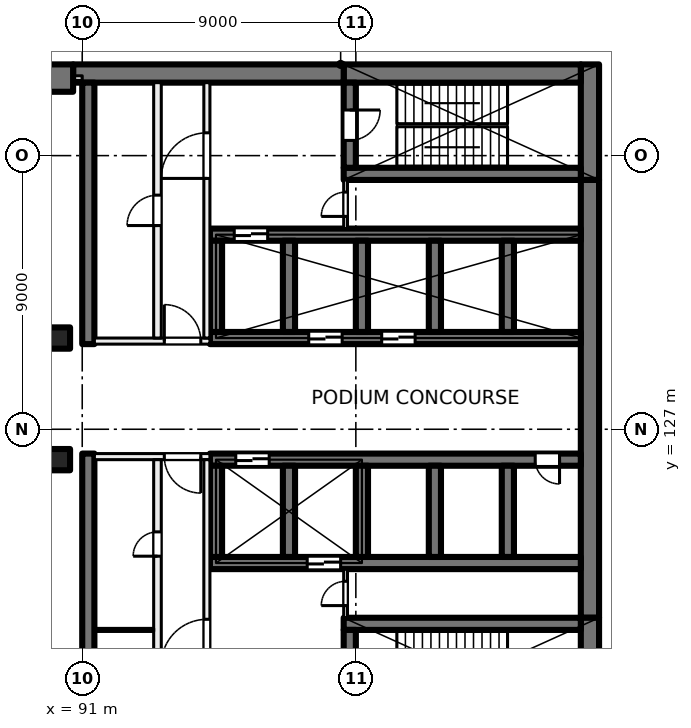
"""IFC4 building model, lengths in metres.
Left out: names, types, materials, properties, quantities, classifications, styles, units other than length and angle.
Written with IfcOpenShell. Run it as: python <this file> out.ifc"""

import sys

from ifc_helpers import new_model, si_unit, direction, frame, frame_2d, origin, origin_2d, place, context, subcontext, project, spatial, rectangle, extrude, element, fill, save


model = new_model("IFC4")
c1 = context("Model", 3, precision=1e-05, world=origin(), true_north=direction((0.0, 1.0)))
c2 = subcontext(c1, "Body", "Model", "MODEL_VIEW")
j1 = project(units=[si_unit("LENGTHUNIT", "METRE"), si_unit("PLANEANGLEUNIT", "RADIAN")], contexts=[c1])
p1 = place(None, origin())
s1 = spatial("IfcSite", under=j1, at=p1, CompositionType="ELEMENT")
p2 = place(p1, origin())
s2 = spatial("IfcBuilding", under=s1, at=p2, CompositionType="ELEMENT")
p3 = place(p2, frame((0.0, 0.0, 22.5)))
s3 = spatial("IfcBuildingStorey", under=s2, at=p3, CompositionType="ELEMENT", Elevation=22.5)
for number, where, z_axis, x_axis in (
    (1, (90.25, 130.0, 0.0), (0.0, 0.0, 1.0), (1.0, 0.0, 0.0)),
    (2, (90.25, 126.0, 0.0), (0.0, 0.0, 1.0), (1.0, 0.0, 0.0)),
):
    element("IfcColumn", number, at=place(p3, frame(where, z_axis=z_axis, x_axis=x_axis)), inside=s3, PredefinedType="COLUMN", context=c2, shape_type="SweptSolid", body=[
        extrude(rectangle(XDim=0.7, YDim=0.7, at=origin_2d()), origin(), (0.0, 0.0, 1.0), 5.0),
    ])
p4 = place(p3, frame((90.25, 138.55, 0.0), z_axis=(0.0, 0.0, 1.0), x_axis=(1.0, 0.0, 0.0)))
e3 = element("IfcColumn", 3, at=p4, inside=s3, PredefinedType="COLUMN", context=c2, shape_type="SweptSolid", body=[
    extrude(rectangle(XDim=0.9, YDim=0.9, at=origin_2d()), origin(), (0.0, 0.0, 1.0), 5.0),
])
p5 = place(p3, frame((107.7, 139.0, 0.0), z_axis=(0.0, 0.0, 1.0), x_axis=(0.0, -1.0, 0.0)))
e4 = element("IfcWall", 4, at=p5, inside=s3, PredefinedType="SHEAR", context=c2, shape_type="SweptSolid", body=[
    extrude(rectangle(XDim=3.8, YDim=0.6, at=frame_2d((1.9, 0.0))), origin(), (0.0, 0.0, 1.0), 5.0),
])
p6 = place(p3, frame((107.7, 135.2, 0.0), z_axis=(0.0, 0.0, 1.0), x_axis=(0.0, -1.0, 0.0)))
e5 = element("IfcWall", 5, at=p6, inside=s3, PredefinedType="SHEAR", context=c2, shape_type="SweptSolid", body=[
    extrude(rectangle(XDim=14.4, YDim=0.6, at=frame_2d((7.2, 0.0))), origin(), (0.0, 0.0, 1.0), 5.0),
])
p7 = place(p3, frame((107.7, 120.8, 0.0), z_axis=(0.0, 0.0, 1.0), x_axis=(0.0, -1.0, 0.0)))
e6 = element("IfcWall", 6, at=p7, inside=s3, PredefinedType="SHEAR", context=c2, shape_type="SweptSolid", body=[
    extrude(rectangle(XDim=3.8, YDim=0.6, at=frame_2d((1.9, 0.0))), origin(), (0.0, 0.0, 1.0), 5.0),
])
p8 = place(p3, frame((107.4, 138.7, 0.0), z_axis=(0.0, 0.0, 1.0), x_axis=(-1.0, 0.0, 0.0)))
e7 = element("IfcWall", 7, at=p8, inside=s3, PredefinedType="SHEAR", context=c2, shape_type="SweptSolid", body=[
    extrude(rectangle(XDim=7.8, YDim=0.6, at=frame_2d((3.9, 0.0))), origin(), (0.0, 0.0, 1.0), 5.0),
])
p9 = place(p3, frame((99.6, 138.7, 0.0), z_axis=(0.0, 0.0, 1.0), x_axis=(-1.0, 0.0, 0.0)))
e8 = element("IfcWall", 8, at=p9, inside=s3, PredefinedType="SHEAR", context=c2, shape_type="SweptSolid", body=[
    extrude(rectangle(XDim=8.9, YDim=0.6, at=frame_2d((4.45, 0.0))), origin(), (0.0, 0.0, 1.0), 5.0),
])
p10 = place(p3, frame((107.4, 135.4, 0.0), z_axis=(0.0, 0.0, 1.0), x_axis=(-1.0, 0.0, 0.0)))
e9 = element("IfcWall", 9, at=p10, inside=s3, PredefinedType="SHEAR", context=c2, shape_type="SweptSolid", body=[
    extrude(rectangle(XDim=7.8, YDim=0.4, at=frame_2d((3.9, 0.0))), origin(), (0.0, 0.0, 1.0), 5.0),
])
p11 = place(p3, frame((99.8, 138.4, 0.0), z_axis=(0.0, 0.0, 1.0), x_axis=(0.0, -1.0, 0.0)))
e10 = element("IfcWall", 10, at=p11, inside=s3, PredefinedType="SHEAR", context=c2, shape_type="SweptSolid", body=[
    extrude(rectangle(XDim=2.8, YDim=0.4, at=frame_2d((1.4, 0.0))), origin(), (0.0, 0.0, 1.0), 5.0),
])
p12 = place(p11, frame((0.9, 0.0, 0.0)))
e11 = element("IfcOpeningElement", 11, at=p12, cuts=e10, PredefinedType="OPENING", context=c2, shape_type="SweptSolid", body=[
    extrude(rectangle(XDim=1.0, YDim=2.1, at=frame_2d((0.5, 1.05))), frame((0.0, 0.21, 0.0), z_axis=(0.0, -1.0, 0.0), x_axis=(1.0, 0.0, 0.0)), (0.0, 0.0, 1.0), 0.42),
])
p13 = place(p3, frame((107.4, 120.6, 0.0), z_axis=(0.0, 0.0, 1.0), x_axis=(-1.0, 0.0, 0.0)))
e12 = element("IfcWall", 12, at=p13, inside=s3, PredefinedType="SHEAR", context=c2, shape_type="SweptSolid", body=[
    extrude(rectangle(XDim=7.8, YDim=0.4, at=frame_2d((3.9, 0.0))), origin(), (0.0, 0.0, 1.0), 5.0),
])
p14 = place(p3, frame((99.8, 120.4, 0.0), z_axis=(0.0, 0.0, 1.0), x_axis=(0.0, -1.0, 0.0)))
e13 = element("IfcWall", 13, at=p14, inside=s3, PredefinedType="SHEAR", context=c2, shape_type="SweptSolid", body=[
    extrude(rectangle(XDim=2.8, YDim=0.4, at=frame_2d((1.4, 0.0))), origin(), (0.0, 0.0, 1.0), 5.0),
])
p15 = place(p14, frame((0.9, 0.0, 0.0)))
e14 = element("IfcOpeningElement", 14, at=p15, cuts=e13, PredefinedType="OPENING", context=c2, shape_type="SweptSolid", body=[
    extrude(rectangle(XDim=1.0, YDim=2.1, at=frame_2d((0.5, 1.05))), frame((0.0, 0.21, 0.0), z_axis=(0.0, -1.0, 0.0), x_axis=(1.0, 0.0, 0.0)), (0.0, 0.0, 1.0), 0.42),
])
p16 = place(p3, frame((107.4, 130.0, 0.0), z_axis=(0.0, 0.0, 1.0), x_axis=(-1.0, 0.0, 0.0)))
e15 = element("IfcWall", 15, at=p16, inside=s3, PredefinedType="SHEAR", context=c2, shape_type="SweptSolid", body=[
    extrude(rectangle(XDim=12.2, YDim=0.4, at=frame_2d((6.1, 0.0))), origin(), (0.0, 0.0, 1.0), 5.0),
])
p17 = place(p16, frame((5.45, 0.0, 0.0)))
e16 = element("IfcOpeningElement", 16, at=p17, cuts=e15, PredefinedType="OPENING", context=c2, shape_type="SweptSolid", body=[
    extrude(rectangle(XDim=1.1, YDim=2.1, at=frame_2d((0.55, 1.05))), frame((0.0, 0.21, 0.0), z_axis=(0.0, -1.0, 0.0), x_axis=(1.0, 0.0, 0.0)), (0.0, 0.0, 1.0), 0.42),
])
p18 = place(p16, frame((7.85, 0.0, 0.0)))
e17 = element("IfcOpeningElement", 17, at=p18, cuts=e15, PredefinedType="OPENING", context=c2, shape_type="SweptSolid", body=[
    extrude(rectangle(XDim=1.1, YDim=2.1, at=frame_2d((0.55, 1.05))), frame((0.0, 0.21, 0.0), z_axis=(0.0, -1.0, 0.0), x_axis=(1.0, 0.0, 0.0)), (0.0, 0.0, 1.0), 0.42),
])
p19 = place(p3, frame((107.4, 133.4, 0.0), z_axis=(0.0, 0.0, 1.0), x_axis=(-1.0, 0.0, 0.0)))
e18 = element("IfcWall", 18, at=p19, inside=s3, PredefinedType="SHEAR", context=c2, shape_type="SweptSolid", body=[
    extrude(rectangle(XDim=12.2, YDim=0.4, at=frame_2d((6.1, 0.0))), origin(), (0.0, 0.0, 1.0), 5.0),
])
p20 = place(p19, frame((10.3, 0.0, 0.0)))
e19 = element("IfcOpeningElement", 19, at=p20, cuts=e18, PredefinedType="OPENING", context=c2, shape_type="SweptSolid", body=[
    extrude(rectangle(XDim=1.1, YDim=2.1, at=frame_2d((0.55, 1.05))), frame((0.0, 0.21, 0.0), z_axis=(0.0, -1.0, 0.0), x_axis=(1.0, 0.0, 0.0)), (0.0, 0.0, 1.0), 0.42),
])
for number, where, z_axis, x_axis in (
    (20, (105.0, 133.2, 0.0), (0.0, 0.0, 1.0), (0.0, -1.0, 0.0)),
    (21, (102.6, 133.2, 0.0), (0.0, 0.0, 1.0), (0.0, -1.0, 0.0)),
    (22, (100.2, 133.2, 0.0), (0.0, 0.0, 1.0), (0.0, -1.0, 0.0)),
    (23, (97.8, 133.2, 0.0), (0.0, 0.0, 1.0), (0.0, -1.0, 0.0)),
    (24, (95.4, 133.2, 0.0), (0.0, 0.0, 1.0), (0.0, -1.0, 0.0)),
):
    element("IfcWall", number, at=place(p3, frame(where, z_axis=z_axis, x_axis=x_axis)), inside=s3, PredefinedType="SHEAR", context=c2, shape_type="SweptSolid", body=[
        extrude(rectangle(XDim=3.0, YDim=0.4, at=frame_2d((1.5, 0.0))), origin(), (0.0, 0.0, 1.0), 5.0),
    ])
p21 = place(p3, frame((107.4, 126.0, 0.0), z_axis=(0.0, 0.0, 1.0), x_axis=(-1.0, 0.0, 0.0)))
e25 = element("IfcWall", 25, at=p21, inside=s3, PredefinedType="SHEAR", context=c2, shape_type="SweptSolid", body=[
    extrude(rectangle(XDim=12.2, YDim=0.4, at=frame_2d((6.1, 0.0))), origin(), (0.0, 0.0, 1.0), 5.0),
])
p22 = place(p21, frame((10.25, 0.0, 0.0)))
e26 = element("IfcOpeningElement", 26, at=p22, cuts=e25, PredefinedType="OPENING", context=c2, shape_type="SweptSolid", body=[
    extrude(rectangle(XDim=1.1, YDim=2.1, at=frame_2d((0.55, 1.05))), frame((0.0, 0.21, 0.0), z_axis=(0.0, -1.0, 0.0), x_axis=(1.0, 0.0, 0.0)), (0.0, 0.0, 1.0), 0.42),
])
p23 = place(p21, frame((0.7, 0.0, 0.0)))
e27 = element("IfcOpeningElement", 27, at=p23, cuts=e25, PredefinedType="OPENING", context=c2, shape_type="SweptSolid", body=[
    extrude(rectangle(XDim=0.8, YDim=2.1, at=frame_2d((0.4, 1.05))), frame((0.0, 0.21, 0.0), z_axis=(0.0, -1.0, 0.0), x_axis=(1.0, 0.0, 0.0)), (0.0, 0.0, 1.0), 0.42),
])
p24 = place(p3, frame((107.4, 122.6, 0.0), z_axis=(0.0, 0.0, 1.0), x_axis=(-1.0, 0.0, 0.0)))
e28 = element("IfcWall", 28, at=p24, inside=s3, PredefinedType="SHEAR", context=c2, shape_type="SweptSolid", body=[
    extrude(rectangle(XDim=12.2, YDim=0.4, at=frame_2d((6.1, 0.0))), origin(), (0.0, 0.0, 1.0), 5.0),
])
p25 = place(p24, frame((7.9, 0.0, 0.0)))
e29 = element("IfcOpeningElement", 29, at=p25, cuts=e28, PredefinedType="OPENING", context=c2, shape_type="SweptSolid", body=[
    extrude(rectangle(XDim=1.1, YDim=2.1, at=frame_2d((0.55, 1.05))), frame((0.0, 0.21, 0.0), z_axis=(0.0, -1.0, 0.0), x_axis=(1.0, 0.0, 0.0)), (0.0, 0.0, 1.0), 0.42),
])
for number, where, z_axis, x_axis in (
    (30, (105.0, 125.8, 0.0), (0.0, 0.0, 1.0), (0.0, -1.0, 0.0)),
    (31, (102.6, 125.8, 0.0), (0.0, 0.0, 1.0), (0.0, -1.0, 0.0)),
    (32, (100.2, 125.8, 0.0), (0.0, 0.0, 1.0), (0.0, -1.0, 0.0)),
    (33, (97.8, 125.8, 0.0), (0.0, 0.0, 1.0), (0.0, -1.0, 0.0)),
    (34, (95.4, 125.8, 0.0), (0.0, 0.0, 1.0), (0.0, -1.0, 0.0)),
):
    element("IfcWall", number, at=place(p3, frame(where, z_axis=z_axis, x_axis=x_axis)), inside=s3, PredefinedType="SHEAR", context=c2, shape_type="SweptSolid", body=[
        extrude(rectangle(XDim=3.0, YDim=0.4, at=frame_2d((1.5, 0.0))), origin(), (0.0, 0.0, 1.0), 5.0),
    ])
for number, where, z_axis, x_axis in (
    (35, (91.2, 138.4, 0.0), (0.0, 0.0, 1.0), (0.0, -1.0, 0.0)),
    (36, (91.2, 126.2, 0.0), (0.0, 0.0, 1.0), (0.0, -1.0, 0.0)),
):
    element("IfcWall", number, at=place(p3, frame(where, z_axis=z_axis, x_axis=x_axis)), inside=s3, PredefinedType="SHEAR", context=c2, shape_type="SweptSolid", body=[
        extrude(rectangle(XDim=8.6, YDim=0.4, at=frame_2d((4.3, 0.0))), origin(), (0.0, 0.0, 1.0), 5.0),
    ])
p26 = place(p3, frame((95.2, 126.1, 0.0), z_axis=(0.0, 0.0, 1.0), x_axis=(-1.0, 0.0, 0.0)))
e37 = element("IfcWall", 37, at=p26, inside=s3, PredefinedType="PARTITIONING", context=c2, shape_type="SweptSolid", body=[
    extrude(rectangle(XDim=3.8, YDim=0.2, at=frame_2d((1.9, 0.0))), origin(), (0.0, 0.0, 1.0), 4.625),
])
p27 = place(p26, frame((0.3, 0.0, 0.0)))
e38 = element("IfcOpeningElement", 38, at=p27, cuts=e37, PredefinedType="OPENING", context=c2, shape_type="SweptSolid", body=[
    extrude(rectangle(XDim=1.2, YDim=2.1, at=frame_2d((0.6, 1.05))), frame((0.0, 0.11, 0.0), z_axis=(0.0, -1.0, 0.0), x_axis=(1.0, 0.0, 0.0)), (0.0, 0.0, 1.0), 0.22),
])
p28 = place(p3, frame((95.1, 117.6, 0.0), z_axis=(0.0, 0.0, 1.0), x_axis=(0.0, 1.0, 0.0)))
e39 = element("IfcWall", 39, at=p28, inside=s3, PredefinedType="PARTITIONING", context=c2, shape_type="SweptSolid", body=[
    extrude(rectangle(XDim=8.4, YDim=0.2, at=frame_2d((4.2, 0.0))), origin(), (0.0, 0.0, 1.0), 4.625),
])
p29 = place(p28, frame((1.65, 0.0, 0.0)))
e40 = element("IfcOpeningElement", 40, at=p29, cuts=e39, PredefinedType="OPENING", context=c2, shape_type="SweptSolid", body=[
    extrude(rectangle(XDim=1.5, YDim=2.1, at=frame_2d((0.75, 1.05))), frame((0.0, 0.11, 0.0), z_axis=(0.0, -1.0, 0.0), x_axis=(1.0, 0.0, 0.0)), (0.0, 0.0, 1.0), 0.22),
])
p30 = place(p3, frame((93.475, 117.6, 0.0), z_axis=(0.0, 0.0, 1.0), x_axis=(0.0, 1.0, 0.0)))
e41 = element("IfcWall", 41, at=p30, inside=s3, PredefinedType="PARTITIONING", context=c2, shape_type="SweptSolid", body=[
    extrude(rectangle(XDim=8.4, YDim=0.25, at=frame_2d((4.2, 0.0))), origin(), (0.0, 0.0, 1.0), 4.625),
])
p31 = place(p30, frame((5.225, 0.0, 0.0)))
e42 = element("IfcOpeningElement", 42, at=p31, cuts=e41, PredefinedType="OPENING", context=c2, shape_type="SweptSolid", body=[
    extrude(rectangle(XDim=0.8, YDim=2.1, at=frame_2d((0.4, 1.05))), frame((0.0, 0.135, 0.0), z_axis=(0.0, -1.0, 0.0), x_axis=(1.0, 0.0, 0.0)), (0.0, 0.0, 1.0), 0.27),
])
p32 = place(p30, frame((0.975, 0.0, 0.0)))
e43 = element("IfcOpeningElement", 43, at=p32, cuts=e41, PredefinedType="OPENING", context=c2, shape_type="SweptSolid", body=[
    extrude(rectangle(XDim=0.8, YDim=2.1, at=frame_2d((0.4, 1.05))), frame((0.0, 0.135, 0.0), z_axis=(0.0, -1.0, 0.0), x_axis=(1.0, 0.0, 0.0)), (0.0, 0.0, 1.0), 0.27),
])
p33 = place(p3, frame((99.663, 120.8, 0.0), z_axis=(0.0, 0.0, 1.0), x_axis=(0.0, 1.0, 0.0)))
e44 = element("IfcWall", 44, at=p33, inside=s3, PredefinedType="PARTITIONING", context=c2, shape_type="SweptSolid", body=[
    extrude(rectangle(XDim=1.6, YDim=0.125, at=frame_2d((0.8, 0.0))), origin(), (0.0, 0.0, 1.0), 4.625),
])
p34 = place(p33, frame((0.4, 0.0, 0.0)))
e45 = element("IfcOpeningElement", 45, at=p34, cuts=e44, PredefinedType="OPENING", context=c2, shape_type="SweptSolid", body=[
    extrude(rectangle(XDim=0.8, YDim=2.1, at=frame_2d((0.4, 1.05))), frame((0.0, 0.073, 0.0), z_axis=(0.0, -1.0, 0.0), x_axis=(1.0, 0.0, 0.0)), (0.0, 0.0, 1.0), 0.145),
])
p35 = place(p3, frame((93.35, 120.4, 0.0), z_axis=(0.0, 0.0, 1.0), x_axis=(-1.0, 0.0, 0.0)))
e46 = element("IfcWall", 46, at=p35, inside=s3, PredefinedType="PARTITIONING", context=c2, shape_type="SweptSolid", body=[
    extrude(rectangle(XDim=1.95, YDim=0.1, at=frame_2d((0.975, 0.0))), origin(), (0.0, 0.0, 1.0), 4.625),
])
p36 = place(p3, frame((91.4, 129.9, 0.0), z_axis=(0.0, 0.0, 1.0), x_axis=(1.0, 0.0, 0.0)))
e47 = element("IfcWall", 47, at=p36, inside=s3, PredefinedType="PARTITIONING", context=c2, shape_type="SweptSolid", body=[
    extrude(rectangle(XDim=3.8, YDim=0.2, at=frame_2d((1.9, 0.0))), origin(), (0.0, 0.0, 1.0), 4.625),
])
p37 = place(p36, frame((2.3, 0.0, 0.0)))
e48 = element("IfcOpeningElement", 48, at=p37, cuts=e47, PredefinedType="OPENING", context=c2, shape_type="SweptSolid", body=[
    extrude(rectangle(XDim=1.2, YDim=2.1, at=frame_2d((0.6, 1.05))), frame((0.0, 0.11, 0.0), z_axis=(0.0, -1.0, 0.0), x_axis=(1.0, 0.0, 0.0)), (0.0, 0.0, 1.0), 0.22),
])
p38 = place(p3, frame((95.1, 130.0, 0.0), z_axis=(0.0, 0.0, 1.0), x_axis=(0.0, 1.0, 0.0)))
e49 = element("IfcWall", 49, at=p38, inside=s3, PredefinedType="PARTITIONING", context=c2, shape_type="SweptSolid", body=[
    extrude(rectangle(XDim=8.4, YDim=0.2, at=frame_2d((4.2, 0.0))), origin(), (0.0, 0.0, 1.0), 4.625),
])
p39 = place(p38, frame((5.25, 0.0, 0.0)))
e50 = element("IfcOpeningElement", 50, at=p39, cuts=e49, PredefinedType="OPENING", context=c2, shape_type="SweptSolid", body=[
    extrude(rectangle(XDim=1.5, YDim=2.1, at=frame_2d((0.75, 1.05))), frame((0.0, 0.11, 0.0), z_axis=(0.0, -1.0, 0.0), x_axis=(1.0, 0.0, 0.0)), (0.0, 0.0, 1.0), 0.22),
])
p40 = place(p3, frame((93.475, 130.0, 0.0), z_axis=(0.0, 0.0, 1.0), x_axis=(0.0, 1.0, 0.0)))
e51 = element("IfcWall", 51, at=p40, inside=s3, PredefinedType="PARTITIONING", context=c2, shape_type="SweptSolid", body=[
    extrude(rectangle(XDim=8.4, YDim=0.25, at=frame_2d((4.2, 0.0))), origin(), (0.0, 0.0, 1.0), 4.625),
])
p41 = place(p40, frame((3.7, 0.0, 0.0)))
e52 = element("IfcOpeningElement", 52, at=p41, cuts=e51, PredefinedType="OPENING", context=c2, shape_type="SweptSolid", body=[
    extrude(rectangle(XDim=1.0, YDim=2.1, at=frame_2d((0.5, 1.05))), frame((0.0, 0.135, 0.0), z_axis=(0.0, -1.0, 0.0), x_axis=(1.0, 0.0, 0.0)), (0.0, 0.0, 1.0), 0.27),
])
p42 = place(p3, frame((99.663, 133.6, 0.0), z_axis=(0.0, 0.0, 1.0), x_axis=(0.0, 1.0, 0.0)))
e53 = element("IfcWall", 53, at=p42, inside=s3, PredefinedType="PARTITIONING", context=c2, shape_type="SweptSolid", body=[
    extrude(rectangle(XDim=1.6, YDim=0.125, at=frame_2d((0.8, 0.0))), origin(), (0.0, 0.0, 1.0), 4.625),
])
p43 = place(p42, frame((0.4, 0.0, 0.0)))
e54 = element("IfcOpeningElement", 54, at=p43, cuts=e53, PredefinedType="OPENING", context=c2, shape_type="SweptSolid", body=[
    extrude(rectangle(XDim=0.8, YDim=2.1, at=frame_2d((0.4, 1.05))), frame((0.0, 0.073, 0.0), z_axis=(0.0, -1.0, 0.0), x_axis=(1.0, 0.0, 0.0)), (0.0, 0.0, 1.0), 0.145),
])
p44 = place(p3, frame((49.825, 138.55, 0.0), z_axis=(0.0, 0.0, 1.0), x_axis=(1.0, 0.0, 0.0)))
e55 = element("IfcWall", 55, at=p44, inside=s3, PredefinedType="PARTITIONING", context=c2, shape_type="SweptSolid", body=[
    extrude(rectangle(XDim=41.175, YDim=0.15, at=frame_2d((20.587, 0.0))), origin(), (0.0, 0.0, 1.0), 4.625),
])
p45 = place(p44, frame((37.775, 0.0, 0.0)))
e56 = element("IfcOpeningElement", 56, at=p45, cuts=e55, PredefinedType="OPENING", context=c2, shape_type="SweptSolid", body=[
    extrude(rectangle(XDim=1.8, YDim=2.1, at=frame_2d((0.9, 1.05))), frame((0.0, 0.085, 0.0), z_axis=(0.0, -1.0, 0.0), x_axis=(1.0, 0.0, 0.0)), (0.0, 0.0, 1.0), 0.17),
])
p46 = place(p22, origin())
e57 = element("IfcDoor", 57, at=p46, inside=s3, OperationType="DOUBLE_DOOR_SLIDING", PredefinedType="DOOR", context=c2, shape_type="SweptSolid", body=[
    extrude(rectangle(XDim=1.1, YDim=2.1, at=frame_2d((0.55, 1.05))), frame((0.0, 0.025, 0.0), z_axis=(0.0, -1.0, 0.0), x_axis=(1.0, 0.0, 0.0)), (0.0, 0.0, 1.0), 0.05),
])
fill(e26, e57)
p47 = place(p17, origin())
e58 = element("IfcDoor", 58, at=p47, inside=s3, OperationType="DOUBLE_DOOR_SLIDING", PredefinedType="DOOR", context=c2, shape_type="SweptSolid", body=[
    extrude(rectangle(XDim=1.1, YDim=2.1, at=frame_2d((0.55, 1.05))), frame((0.0, 0.025, 0.0), z_axis=(0.0, -1.0, 0.0), x_axis=(1.0, 0.0, 0.0)), (0.0, 0.0, 1.0), 0.05),
])
fill(e16, e58)
p48 = place(p18, origin())
e59 = element("IfcDoor", 59, at=p48, inside=s3, OperationType="DOUBLE_DOOR_SLIDING", PredefinedType="DOOR", context=c2, shape_type="SweptSolid", body=[
    extrude(rectangle(XDim=1.1, YDim=2.1, at=frame_2d((0.55, 1.05))), frame((0.0, 0.025, 0.0), z_axis=(0.0, -1.0, 0.0), x_axis=(1.0, 0.0, 0.0)), (0.0, 0.0, 1.0), 0.05),
])
fill(e17, e59)
p49 = place(p23, origin())
e60 = element("IfcDoor", 60, at=p49, inside=s3, OperationType="SINGLE_SWING_LEFT", PredefinedType="DOOR", context=c2, shape_type="SweptSolid", body=[
    extrude(rectangle(XDim=0.8, YDim=2.1, at=frame_2d((0.4, 1.05))), frame((0.0, 0.025, 0.0), z_axis=(0.0, -1.0, 0.0), x_axis=(1.0, 0.0, 0.0)), (0.0, 0.0, 1.0), 0.05),
])
fill(e27, e60)
p50 = place(p27, origin())
e61 = element("IfcDoor", 61, at=p50, inside=s3, OperationType="DOUBLE_DOOR_SINGLE_SWING", PredefinedType="DOOR", context=c2, shape_type="SweptSolid", body=[
    extrude(rectangle(XDim=1.2, YDim=2.1, at=frame_2d((0.6, 1.05))), frame((0.0, 0.025, 0.0), z_axis=(0.0, -1.0, 0.0), x_axis=(1.0, 0.0, 0.0)), (0.0, 0.0, 1.0), 0.05),
])
fill(e38, e61)
p51 = place(p29, origin())
e62 = element("IfcDoor", 62, at=p51, inside=s3, OperationType="DOUBLE_DOOR_SINGLE_SWING", PredefinedType="DOOR", context=c2, shape_type="SweptSolid", body=[
    extrude(rectangle(XDim=1.5, YDim=2.1, at=frame_2d((0.75, 1.05))), frame((0.0, 0.025, 0.0), z_axis=(0.0, -1.0, 0.0), x_axis=(1.0, 0.0, 0.0)), (0.0, 0.0, 1.0), 0.05),
])
fill(e40, e62)
p52 = place(p34, origin())
e63 = element("IfcDoor", 63, at=p52, inside=s3, OperationType="SINGLE_SWING_RIGHT", PredefinedType="DOOR", context=c2, shape_type="SweptSolid", body=[
    extrude(rectangle(XDim=0.8, YDim=2.1, at=frame_2d((0.4, 1.05))), frame((0.0, 0.025, 0.0), z_axis=(0.0, -1.0, 0.0), x_axis=(1.0, 0.0, 0.0)), (0.0, 0.0, 1.0), 0.05),
])
fill(e45, e63)
p53 = place(p31, origin())
e64 = element("IfcDoor", 64, at=p53, inside=s3, OperationType="SINGLE_SWING_LEFT", PredefinedType="DOOR", context=c2, shape_type="SweptSolid", body=[
    extrude(rectangle(XDim=0.8, YDim=2.1, at=frame_2d((0.4, 1.05))), frame((0.0, 0.025, 0.0), z_axis=(0.0, -1.0, 0.0), x_axis=(1.0, 0.0, 0.0)), (0.0, 0.0, 1.0), 0.05),
])
fill(e42, e64)
p54 = place(p37, origin())
e65 = element("IfcDoor", 65, at=p54, inside=s3, OperationType="DOUBLE_DOOR_SINGLE_SWING", PredefinedType="DOOR", context=c2, shape_type="SweptSolid", body=[
    extrude(rectangle(XDim=1.2, YDim=2.1, at=frame_2d((0.6, 1.05))), frame((0.0, 0.025, 0.0), z_axis=(0.0, -1.0, 0.0), x_axis=(1.0, 0.0, 0.0)), (0.0, 0.0, 1.0), 0.05),
])
fill(e48, e65)
p55 = place(p39, origin())
e66 = element("IfcDoor", 66, at=p55, inside=s3, OperationType="DOUBLE_DOOR_SINGLE_SWING", PredefinedType="DOOR", context=c2, shape_type="SweptSolid", body=[
    extrude(rectangle(XDim=1.5, YDim=2.1, at=frame_2d((0.75, 1.05))), frame((0.0, 0.025, 0.0), z_axis=(0.0, -1.0, 0.0), x_axis=(1.0, 0.0, 0.0)), (0.0, 0.0, 1.0), 0.05),
])
fill(e50, e66)
p56 = place(p12, origin())
e67 = element("IfcDoor", 67, at=p56, inside=s3, OperationType="SINGLE_SWING_RIGHT", PredefinedType="DOOR", context=c2, shape_type="SweptSolid", body=[
    extrude(rectangle(XDim=1.0, YDim=2.1, at=frame_2d((0.5, 1.05))), frame((0.0, 0.025, 0.0), z_axis=(0.0, -1.0, 0.0), x_axis=(1.0, 0.0, 0.0)), (0.0, 0.0, 1.0), 0.05),
])
fill(e11, e67)
p57 = place(p43, origin())
e68 = element("IfcDoor", 68, at=p57, inside=s3, OperationType="SINGLE_SWING_LEFT", PredefinedType="DOOR", context=c2, shape_type="SweptSolid", body=[
    extrude(rectangle(XDim=0.8, YDim=2.1, at=frame_2d((0.4, 1.05))), frame((0.0, 0.025, 0.0), z_axis=(0.0, -1.0, 0.0), x_axis=(1.0, 0.0, 0.0)), (0.0, 0.0, 1.0), 0.05),
])
fill(e54, e68)
p58 = place(p41, origin())
e69 = element("IfcDoor", 69, at=p58, inside=s3, OperationType="SINGLE_SWING_RIGHT", PredefinedType="DOOR", context=c2, shape_type="SweptSolid", body=[
    extrude(rectangle(XDim=1.0, YDim=2.1, at=frame_2d((0.5, 1.05))), frame((0.0, 0.025, 0.0), z_axis=(0.0, -1.0, 0.0), x_axis=(1.0, 0.0, 0.0)), (0.0, 0.0, 1.0), 0.05),
])
fill(e52, e69)
p59 = place(p20, origin())
e70 = element("IfcDoor", 70, at=p59, inside=s3, OperationType="DOUBLE_DOOR_SLIDING", PredefinedType="DOOR", context=c2, shape_type="SweptSolid", body=[
    extrude(rectangle(XDim=1.1, YDim=2.1, at=frame_2d((0.55, 1.05))), frame((0.0, 0.025, 0.0), z_axis=(0.0, -1.0, 0.0), x_axis=(1.0, 0.0, 0.0)), (0.0, 0.0, 1.0), 0.05),
])
fill(e19, e70)
p60 = place(p25, origin())
e71 = element("IfcDoor", 71, at=p60, inside=s3, OperationType="DOUBLE_DOOR_SLIDING", PredefinedType="DOOR", context=c2, shape_type="SweptSolid", body=[
    extrude(rectangle(XDim=1.1, YDim=2.1, at=frame_2d((0.55, 1.05))), frame((0.0, 0.025, 0.0), z_axis=(0.0, -1.0, 0.0), x_axis=(1.0, 0.0, 0.0)), (0.0, 0.0, 1.0), 0.05),
])
fill(e29, e71)
save(model, sys.argv[1])
